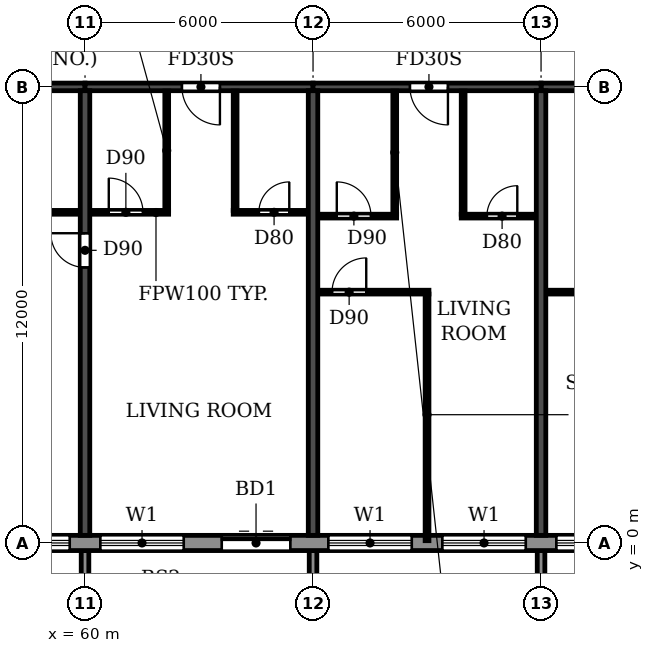
"""IFC4 building model, lengths in metres.
Left out: names, types, materials, properties, quantities, classifications, styles, units other than length and angle.
Written with IfcOpenShell. Run it as: python <this file> out.ifc"""

import sys

from ifc_helpers import new_model, si_unit, direction, frame, frame_2d, origin, place, context, subcontext, project, spatial, polyline, rectangle, outline, extrude, source, transform, mapped, element, fill, save


model = new_model("IFC4")
c1 = context("Model", 3, precision=1e-05, world=origin(), true_north=direction((0.0, 1.0)))
c2 = subcontext(c1, "Body", "Model", "MODEL_VIEW")
j1 = project(units=[si_unit("LENGTHUNIT", "METRE"), si_unit("PLANEANGLEUNIT", "RADIAN")], contexts=[c1])
p1 = place(None, origin())
s1 = spatial("IfcSite", under=j1, at=p1, CompositionType="ELEMENT")
p2 = place(p1, origin())
s2 = spatial("IfcBuilding", under=s1, at=p2, CompositionType="ELEMENT")
p3 = place(p2, frame((0.0, 0.0, 251.1)))
s3 = spatial("IfcBuildingStorey", under=s2, at=p3, CompositionType="ELEMENT", Elevation=251.1)
p4 = place(p3, frame((60.0, 0.2, 0.0), z_axis=(0.0, 0.0, 1.0), x_axis=(0.0, 1.0, 0.0)))
e1 = element("IfcWall", 1, at=p4, inside=s3, PredefinedType="SHEAR", context=c2, shape_type="SweptSolid", body=[
    extrude(rectangle(XDim=11.7, YDim=0.25, at=frame_2d((5.85, 0.0))), origin(), (0.0, 0.0, 1.0), 3.08),
])
p5 = place(p4, frame((7.05, 0.0, 0.0)))
e2 = element("IfcOpeningElement", 2, at=p5, cuts=e1, PredefinedType="OPENING", context=c2, shape_type="SweptSolid", body=[
    extrude(rectangle(XDim=0.9, YDim=2.1, at=frame_2d((0.45, 1.05))), frame((0.0, 0.135, 0.0), z_axis=(0.0, -1.0, 0.0), x_axis=(1.0, 0.0, 0.0)), (0.0, 0.0, 1.0), 0.27),
])
for number, where, z_axis, x_axis in (
    (3, (66.0, 0.2, 0.0), (0.0, 0.0, 1.0), (0.0, 1.0, 0.0)),
    (4, (72.0, 0.2, 0.0), (0.0, 0.0, 1.0), (0.0, 1.0, 0.0)),
):
    element("IfcWall", number, at=place(p3, frame(where, z_axis=z_axis, x_axis=x_axis)), inside=s3, PredefinedType="SHEAR", context=c2, shape_type="SweptSolid", body=[
        extrude(rectangle(XDim=11.7, YDim=0.25, at=frame_2d((5.85, 0.0))), origin(), (0.0, 0.0, 1.0), 3.08),
    ])
p6 = place(p3, frame((54.0, 12.0, 0.0), z_axis=(0.0, 0.0, 1.0), x_axis=(1.0, 0.0, 0.0)))
e5 = element("IfcWall", 5, at=p6, inside=s3, PredefinedType="SHEAR", context=c2, shape_type="SweptSolid", body=[
    extrude(rectangle(XDim=6.0, YDim=0.2, at=frame_2d((3.0, 0.0))), origin(), (0.0, 0.0, 1.0), 2.48),
])
p7 = place(p3, frame((60.0, 12.0, 0.0), z_axis=(0.0, 0.0, 1.0), x_axis=(1.0, 0.0, 0.0)))
e6 = element("IfcWall", 6, at=p7, inside=s3, PredefinedType="SHEAR", context=c2, shape_type="SweptSolid", body=[
    extrude(rectangle(XDim=6.0, YDim=0.2, at=frame_2d((3.0, 0.0))), origin(), (0.0, 0.0, 1.0), 2.48),
])
p8 = place(p7, frame((2.55, 0.0, 0.0)))
e7 = element("IfcOpeningElement", 7, at=p8, cuts=e6, PredefinedType="OPENING", context=c2, shape_type="SweptSolid", body=[
    extrude(rectangle(XDim=1.0, YDim=2.1, at=frame_2d((0.5, 1.05))), frame((0.0, 0.11, 0.0), z_axis=(0.0, -1.0, 0.0), x_axis=(1.0, 0.0, 0.0)), (0.0, 0.0, 1.0), 0.22),
])
p9 = place(p3, frame((66.0, 12.0, 0.0), z_axis=(0.0, 0.0, 1.0), x_axis=(1.0, 0.0, 0.0)))
e8 = element("IfcWall", 8, at=p9, inside=s3, PredefinedType="SHEAR", context=c2, shape_type="SweptSolid", body=[
    extrude(rectangle(XDim=6.0, YDim=0.2, at=frame_2d((3.0, 0.0))), origin(), (0.0, 0.0, 1.0), 2.48),
])
p10 = place(p9, frame((2.55, 0.0, 0.0)))
e9 = element("IfcOpeningElement", 9, at=p10, cuts=e8, PredefinedType="OPENING", context=c2, shape_type="SweptSolid", body=[
    extrude(rectangle(XDim=1.0, YDim=2.1, at=frame_2d((0.5, 1.05))), frame((0.0, 0.11, 0.0), z_axis=(0.0, -1.0, 0.0), x_axis=(1.0, 0.0, 0.0)), (0.0, 0.0, 1.0), 0.22),
])
p11 = place(p3, frame((72.0, 12.0, 0.0), z_axis=(0.0, 0.0, 1.0), x_axis=(1.0, 0.0, 0.0)))
e10 = element("IfcWall", 10, at=p11, inside=s3, PredefinedType="SHEAR", context=c2, shape_type="SweptSolid", body=[
    extrude(rectangle(XDim=6.0, YDim=0.2, at=frame_2d((3.0, 0.0))), origin(), (0.0, 0.0, 1.0), 2.48),
])
p12 = place(p11, frame((2.45, 0.0, 0.0)))
e11 = element("IfcOpeningElement", 11, at=p12, cuts=e10, PredefinedType="OPENING", context=c2, shape_type="SweptSolid", body=[
    extrude(rectangle(XDim=1.0, YDim=2.1, at=frame_2d((0.5, 1.05))), frame((0.0, 0.11, 0.0), z_axis=(0.0, -1.0, 0.0), x_axis=(1.0, 0.0, 0.0)), (0.0, 0.0, 1.0), 0.22),
])
p13 = place(p3, frame((22.683, 0.0, 0.0), z_axis=(0.0, 0.0, 1.0), x_axis=(1.0, 0.0, 0.0)))
e12 = element("IfcWall", 12, at=p13, inside=s3, PredefinedType="STANDARD", context=c2, shape_type="SweptSolid", body=[
    extrude(rectangle(XDim=56.634, YDim=0.4, at=frame_2d((28.317, 0.0))), origin(), (0.0, 0.0, 1.0), 3.08),
])
p14 = place(p13, frame((1.717, 0.0, 0.9)))
e13 = element("IfcOpeningElement", 13, at=p14, cuts=e12, PredefinedType="OPENING", context=c2, shape_type="SweptSolid", body=[
    extrude(rectangle(XDim=2.2, YDim=1.5, at=frame_2d((1.1, 0.75))), frame((0.0, 0.21, 0.0), z_axis=(0.0, -1.0, 0.0), x_axis=(1.0, 0.0, 0.0)), (0.0, 0.0, 1.0), 0.42),
])
p15 = place(p13, frame((4.917, 0.0, 0.0)))
e14 = element("IfcOpeningElement", 14, at=p15, cuts=e12, PredefinedType="OPENING", context=c2, shape_type="SweptSolid", body=[
    extrude(rectangle(XDim=1.8, YDim=2.4, at=frame_2d((0.9, 1.2))), frame((0.0, 0.21, 0.0), z_axis=(0.0, -1.0, 0.0), x_axis=(1.0, 0.0, 0.0)), (0.0, 0.0, 1.0), 0.42),
])
p16 = place(p13, frame((7.717, 0.0, 0.9)))
e15 = element("IfcOpeningElement", 15, at=p16, cuts=e12, PredefinedType="OPENING", context=c2, shape_type="SweptSolid", body=[
    extrude(rectangle(XDim=2.2, YDim=1.5, at=frame_2d((1.1, 0.75))), frame((0.0, 0.21, 0.0), z_axis=(0.0, -1.0, 0.0), x_axis=(1.0, 0.0, 0.0)), (0.0, 0.0, 1.0), 0.42),
])
p17 = place(p13, frame((10.717, 0.0, 0.9)))
e16 = element("IfcOpeningElement", 16, at=p17, cuts=e12, PredefinedType="OPENING", context=c2, shape_type="SweptSolid", body=[
    extrude(rectangle(XDim=2.2, YDim=1.5, at=frame_2d((1.1, 0.75))), frame((0.0, 0.21, 0.0), z_axis=(0.0, -1.0, 0.0), x_axis=(1.0, 0.0, 0.0)), (0.0, 0.0, 1.0), 0.42),
])
p18 = place(p13, frame((13.717, 0.0, 0.9)))
e17 = element("IfcOpeningElement", 17, at=p18, cuts=e12, PredefinedType="OPENING", context=c2, shape_type="SweptSolid", body=[
    extrude(rectangle(XDim=2.2, YDim=1.5, at=frame_2d((1.1, 0.75))), frame((0.0, 0.21, 0.0), z_axis=(0.0, -1.0, 0.0), x_axis=(1.0, 0.0, 0.0)), (0.0, 0.0, 1.0), 0.42),
])
p19 = place(p13, frame((16.917, 0.0, 0.0)))
e18 = element("IfcOpeningElement", 18, at=p19, cuts=e12, PredefinedType="OPENING", context=c2, shape_type="SweptSolid", body=[
    extrude(rectangle(XDim=1.8, YDim=2.4, at=frame_2d((0.9, 1.2))), frame((0.0, 0.21, 0.0), z_axis=(0.0, -1.0, 0.0), x_axis=(1.0, 0.0, 0.0)), (0.0, 0.0, 1.0), 0.42),
])
p20 = place(p13, frame((19.717, 0.0, 0.9)))
e19 = element("IfcOpeningElement", 19, at=p20, cuts=e12, PredefinedType="OPENING", context=c2, shape_type="SweptSolid", body=[
    extrude(rectangle(XDim=2.2, YDim=1.5, at=frame_2d((1.1, 0.75))), frame((0.0, 0.21, 0.0), z_axis=(0.0, -1.0, 0.0), x_axis=(1.0, 0.0, 0.0)), (0.0, 0.0, 1.0), 0.42),
])
p21 = place(p13, frame((22.717, 0.0, 0.9)))
e20 = element("IfcOpeningElement", 20, at=p21, cuts=e12, PredefinedType="OPENING", context=c2, shape_type="SweptSolid", body=[
    extrude(rectangle(XDim=2.2, YDim=1.5, at=frame_2d((1.1, 0.75))), frame((0.0, 0.21, 0.0), z_axis=(0.0, -1.0, 0.0), x_axis=(1.0, 0.0, 0.0)), (0.0, 0.0, 1.0), 0.42),
])
p22 = place(p13, frame((25.717, 0.0, 0.9)))
e21 = element("IfcOpeningElement", 21, at=p22, cuts=e12, PredefinedType="OPENING", context=c2, shape_type="SweptSolid", body=[
    extrude(rectangle(XDim=2.2, YDim=1.5, at=frame_2d((1.1, 0.75))), frame((0.0, 0.21, 0.0), z_axis=(0.0, -1.0, 0.0), x_axis=(1.0, 0.0, 0.0)), (0.0, 0.0, 1.0), 0.42),
])
p23 = place(p13, frame((28.917, 0.0, 0.0)))
e22 = element("IfcOpeningElement", 22, at=p23, cuts=e12, PredefinedType="OPENING", context=c2, shape_type="SweptSolid", body=[
    extrude(rectangle(XDim=1.8, YDim=2.4, at=frame_2d((0.9, 1.2))), frame((0.0, 0.21, 0.0), z_axis=(0.0, -1.0, 0.0), x_axis=(1.0, 0.0, 0.0)), (0.0, 0.0, 1.0), 0.42),
])
p24 = place(p13, frame((31.717, 0.0, 0.9)))
e23 = element("IfcOpeningElement", 23, at=p24, cuts=e12, PredefinedType="OPENING", context=c2, shape_type="SweptSolid", body=[
    extrude(rectangle(XDim=2.2, YDim=1.5, at=frame_2d((1.1, 0.75))), frame((0.0, 0.21, 0.0), z_axis=(0.0, -1.0, 0.0), x_axis=(1.0, 0.0, 0.0)), (0.0, 0.0, 1.0), 0.42),
])
p25 = place(p13, frame((34.717, 0.0, 0.9)))
e24 = element("IfcOpeningElement", 24, at=p25, cuts=e12, PredefinedType="OPENING", context=c2, shape_type="SweptSolid", body=[
    extrude(rectangle(XDim=2.2, YDim=1.5, at=frame_2d((1.1, 0.75))), frame((0.0, 0.21, 0.0), z_axis=(0.0, -1.0, 0.0), x_axis=(1.0, 0.0, 0.0)), (0.0, 0.0, 1.0), 0.42),
])
p26 = place(p13, frame((37.717, 0.0, 0.9)))
e25 = element("IfcOpeningElement", 25, at=p26, cuts=e12, PredefinedType="OPENING", context=c2, shape_type="SweptSolid", body=[
    extrude(rectangle(XDim=2.2, YDim=1.5, at=frame_2d((1.1, 0.75))), frame((0.0, 0.21, 0.0), z_axis=(0.0, -1.0, 0.0), x_axis=(1.0, 0.0, 0.0)), (0.0, 0.0, 1.0), 0.42),
])
p27 = place(p13, frame((40.917, 0.0, 0.0)))
e26 = element("IfcOpeningElement", 26, at=p27, cuts=e12, PredefinedType="OPENING", context=c2, shape_type="SweptSolid", body=[
    extrude(rectangle(XDim=1.8, YDim=2.4, at=frame_2d((0.9, 1.2))), frame((0.0, 0.21, 0.0), z_axis=(0.0, -1.0, 0.0), x_axis=(1.0, 0.0, 0.0)), (0.0, 0.0, 1.0), 0.42),
])
p28 = place(p13, frame((43.717, 0.0, 0.9)))
e27 = element("IfcOpeningElement", 27, at=p28, cuts=e12, PredefinedType="OPENING", context=c2, shape_type="SweptSolid", body=[
    extrude(rectangle(XDim=2.2, YDim=1.5, at=frame_2d((1.1, 0.75))), frame((0.0, 0.21, 0.0), z_axis=(0.0, -1.0, 0.0), x_axis=(1.0, 0.0, 0.0)), (0.0, 0.0, 1.0), 0.42),
])
p29 = place(p13, frame((46.717, 0.0, 0.9)))
e28 = element("IfcOpeningElement", 28, at=p29, cuts=e12, PredefinedType="OPENING", context=c2, shape_type="SweptSolid", body=[
    extrude(rectangle(XDim=2.2, YDim=1.5, at=frame_2d((1.1, 0.75))), frame((0.0, 0.21, 0.0), z_axis=(0.0, -1.0, 0.0), x_axis=(1.0, 0.0, 0.0)), (0.0, 0.0, 1.0), 0.42),
])
p30 = place(p13, frame((49.717, 0.0, 0.9)))
e29 = element("IfcOpeningElement", 29, at=p30, cuts=e12, PredefinedType="OPENING", context=c2, shape_type="SweptSolid", body=[
    extrude(rectangle(XDim=2.2, YDim=1.5, at=frame_2d((1.1, 0.75))), frame((0.0, 0.21, 0.0), z_axis=(0.0, -1.0, 0.0), x_axis=(1.0, 0.0, 0.0)), (0.0, 0.0, 1.0), 0.42),
])
p31 = place(p13, frame((52.917, 0.0, 0.0)))
e30 = element("IfcOpeningElement", 30, at=p31, cuts=e12, PredefinedType="OPENING", context=c2, shape_type="SweptSolid", body=[
    extrude(rectangle(XDim=1.8, YDim=2.4, at=frame_2d((0.9, 1.2))), frame((0.0, 0.21, 0.0), z_axis=(0.0, -1.0, 0.0), x_axis=(1.0, 0.0, 0.0)), (0.0, 0.0, 1.0), 0.42),
])
m1 = source(origin(), c2, "Body", "SweptSolid", [
    extrude(outline(polyline([(0.0, 0.0), (0.2, 0.0), (0.2, 1.65), (0.0, 1.65), (0.0, 0.0)])), origin(), (0.0, 0.0, 1.0), 3.1),
])
for number, where in (
    (31, (59.9, -1.85, 0.0)),
    (32, (65.9, -1.85, 0.0)),
    (33, (71.9, -1.85, 0.0)),
):
    element("IfcWall", number, at=place(p3, frame(where)), inside=s3, PredefinedType="STANDARD", context=c2, shape_type="MappedRepresentation", body=[
        mapped(m1, transform((0.0, 0.0, 0.0))),
    ])
p32 = place(p3, frame((66.135, 6.6, 0.0), z_axis=(0.0, 0.0, 1.0), x_axis=(1.0, 0.0, 0.0)))
e34 = element("IfcWall", 34, at=p32, inside=s3, PredefinedType="PARTITIONING", context=c2, shape_type="SweptSolid", body=[
    extrude(rectangle(XDim=2.915, YDim=0.1, at=frame_2d((1.458, 0.0))), origin(), (0.0, 0.0, 1.0), 3.08),
])
p33 = place(p32, frame((0.365, 0.0, 0.0)))
e35 = element("IfcOpeningElement", 35, at=p33, cuts=e34, PredefinedType="OPENING", context=c2, shape_type="SweptSolid", body=[
    extrude(rectangle(XDim=0.9, YDim=2.1, at=frame_2d((0.45, 1.05))), frame((0.0, 0.06, 0.0), z_axis=(0.0, -1.0, 0.0), x_axis=(1.0, 0.0, 0.0)), (0.0, 0.0, 1.0), 0.12),
])
p34 = place(p3, frame((72.135, 6.6, 0.0), z_axis=(0.0, 0.0, 1.0), x_axis=(1.0, 0.0, 0.0)))
e36 = element("IfcWall", 36, at=p34, inside=s3, PredefinedType="PARTITIONING", context=c2, shape_type="SweptSolid", body=[
    extrude(rectangle(XDim=1.965, YDim=0.1, at=frame_2d((0.982, 0.0))), origin(), (0.0, 0.0, 1.0), 3.08),
])
p35 = place(p3, frame((66.135, 8.6, 0.0), z_axis=(0.0, 0.0, 1.0), x_axis=(1.0, 0.0, 0.0)))
e37 = element("IfcWall", 37, at=p35, inside=s3, PredefinedType="PARTITIONING", context=c2, shape_type="SweptSolid", body=[
    extrude(rectangle(XDim=2.065, YDim=0.1, at=frame_2d((1.032, 0.0))), origin(), (0.0, 0.0, 1.0), 3.08),
])
p36 = place(p35, frame((0.49, 0.0, 0.0)))
e38 = element("IfcOpeningElement", 38, at=p36, cuts=e37, PredefinedType="OPENING", context=c2, shape_type="SweptSolid", body=[
    extrude(rectangle(XDim=0.9, YDim=2.1, at=frame_2d((0.45, 1.05))), frame((0.0, 0.06, 0.0), z_axis=(0.0, -1.0, 0.0), x_axis=(1.0, 0.0, 0.0)), (0.0, 0.0, 1.0), 0.12),
])
p37 = place(p3, frame((69.9, 8.6, 0.0), z_axis=(0.0, 0.0, 1.0), x_axis=(1.0, 0.0, 0.0)))
e39 = element("IfcWall", 39, at=p37, inside=s3, PredefinedType="PARTITIONING", context=c2, shape_type="SweptSolid", body=[
    extrude(rectangle(XDim=1.965, YDim=0.1, at=frame_2d((0.982, 0.0))), origin(), (0.0, 0.0, 1.0), 3.08),
])
p38 = place(p37, frame((0.675, 0.0, 0.0)))
e40 = element("IfcOpeningElement", 40, at=p38, cuts=e39, PredefinedType="OPENING", context=c2, shape_type="SweptSolid", body=[
    extrude(rectangle(XDim=0.8, YDim=2.1, at=frame_2d((0.4, 1.05))), frame((0.0, 0.06, 0.0), z_axis=(0.0, -1.0, 0.0), x_axis=(1.0, 0.0, 0.0)), (0.0, 0.0, 1.0), 0.12),
])
p39 = place(p3, frame((57.1, 8.7, 0.0), z_axis=(0.0, 0.0, 1.0), x_axis=(1.0, 0.0, 0.0)))
e41 = element("IfcWall", 41, at=p39, inside=s3, PredefinedType="PARTITIONING", context=c2, shape_type="SweptSolid", body=[
    extrude(rectangle(XDim=2.765, YDim=0.1, at=frame_2d((1.382, 0.0))), origin(), (0.0, 0.0, 1.0), 3.08),
])
p40 = place(p39, frame((1.0, 0.0, 0.0)))
e42 = element("IfcOpeningElement", 42, at=p40, cuts=e41, PredefinedType="OPENING", context=c2, shape_type="SweptSolid", body=[
    extrude(rectangle(XDim=0.8, YDim=2.1, at=frame_2d((0.4, 1.05))), frame((0.0, 0.06, 0.0), z_axis=(0.0, -1.0, 0.0), x_axis=(1.0, 0.0, 0.0)), (0.0, 0.0, 1.0), 0.12),
])
p41 = place(p3, frame((60.135, 8.7, 0.0), z_axis=(0.0, 0.0, 1.0), x_axis=(1.0, 0.0, 0.0)))
e43 = element("IfcWall", 43, at=p41, inside=s3, PredefinedType="PARTITIONING", context=c2, shape_type="SweptSolid", body=[
    extrude(rectangle(XDim=2.065, YDim=0.1, at=frame_2d((1.032, 0.0))), origin(), (0.0, 0.0, 1.0), 3.08),
])
p42 = place(p41, frame((0.49, 0.0, 0.0)))
e44 = element("IfcOpeningElement", 44, at=p42, cuts=e43, PredefinedType="OPENING", context=c2, shape_type="SweptSolid", body=[
    extrude(rectangle(XDim=0.9, YDim=2.1, at=frame_2d((0.45, 1.05))), frame((0.0, 0.06, 0.0), z_axis=(0.0, -1.0, 0.0), x_axis=(1.0, 0.0, 0.0)), (0.0, 0.0, 1.0), 0.12),
])
p43 = place(p3, frame((63.9, 8.7, 0.0), z_axis=(0.0, 0.0, 1.0), x_axis=(1.0, 0.0, 0.0)))
e45 = element("IfcWall", 45, at=p43, inside=s3, PredefinedType="PARTITIONING", context=c2, shape_type="SweptSolid", body=[
    extrude(rectangle(XDim=1.965, YDim=0.1, at=frame_2d((0.982, 0.0))), origin(), (0.0, 0.0, 1.0), 3.08),
])
p44 = place(p43, frame((0.675, 0.0, 0.0)))
e46 = element("IfcOpeningElement", 46, at=p44, cuts=e45, PredefinedType="OPENING", context=c2, shape_type="SweptSolid", body=[
    extrude(rectangle(XDim=0.8, YDim=2.1, at=frame_2d((0.4, 1.05))), frame((0.0, 0.06, 0.0), z_axis=(0.0, -1.0, 0.0), x_axis=(1.0, 0.0, 0.0)), (0.0, 0.0, 1.0), 0.12),
])
for number, where, z_axis, x_axis in (
    (47, (62.15, 8.75, 0.0), (0.0, 0.0, 1.0), (0.0, 1.0, 0.0)),
    (48, (63.95, 8.75, 0.0), (0.0, 0.0, 1.0), (0.0, 1.0, 0.0)),
):
    element("IfcWall", number, at=place(p3, frame(where, z_axis=z_axis, x_axis=x_axis)), inside=s3, PredefinedType="PARTITIONING", context=c2, shape_type="SweptSolid", body=[
        extrude(rectangle(XDim=3.14, YDim=0.1, at=frame_2d((1.57, 0.0))), origin(), (0.0, 0.0, 1.0), 3.08),
    ])
p45 = place(p3, frame((68.15, 8.65, 0.0), z_axis=(0.0, 0.0, 1.0), x_axis=(0.0, 1.0, 0.0)))
e49 = element("IfcWall", 49, at=p45, inside=s3, PredefinedType="PARTITIONING", context=c2, shape_type="SweptSolid", body=[
    extrude(rectangle(XDim=3.24, YDim=0.1, at=frame_2d((1.62, 0.0))), origin(), (0.0, 0.0, 1.0), 3.08),
])
p46 = place(p3, frame((69.0, 0.06, 0.0), z_axis=(0.0, 0.0, 1.0), x_axis=(0.0, 1.0, 0.0)))
e50 = element("IfcWall", 50, at=p46, inside=s3, PredefinedType="PARTITIONING", context=c2, shape_type="SweptSolid", body=[
    extrude(rectangle(XDim=6.49, YDim=0.1, at=frame_2d((3.245, 0.0))), origin(), (0.0, 0.0, 1.0), 3.08),
])
p47 = place(p3, frame((69.95, 8.65, 0.0), z_axis=(0.0, 0.0, 1.0), x_axis=(0.0, 1.0, 0.0)))
e51 = element("IfcWall", 51, at=p47, inside=s3, PredefinedType="PARTITIONING", context=c2, shape_type="SweptSolid", body=[
    extrude(rectangle(XDim=3.24, YDim=0.1, at=frame_2d((1.62, 0.0))), origin(), (0.0, 0.0, 1.0), 3.08),
])
p48 = place(p25, origin())
e52 = element("IfcWindow", 52, at=p48, inside=s3, PartitioningType="DOUBLE_PANEL_HORIZONTAL", PredefinedType="WINDOW", context=c2, shape_type="SweptSolid", body=[
    extrude(rectangle(XDim=2.2, YDim=1.5, at=frame_2d((1.1, 0.75))), frame((0.0, 0.03, 0.0), z_axis=(0.0, -1.0, 0.0), x_axis=(1.0, 0.0, 0.0)), (0.0, 0.0, 1.0), 0.06),
])
fill(e24, e52)
p49 = place(p26, origin())
e53 = element("IfcWindow", 53, at=p49, inside=s3, PartitioningType="DOUBLE_PANEL_HORIZONTAL", PredefinedType="WINDOW", context=c2, shape_type="SweptSolid", body=[
    extrude(rectangle(XDim=2.2, YDim=1.5, at=frame_2d((1.1, 0.75))), frame((0.0, 0.03, 0.0), z_axis=(0.0, -1.0, 0.0), x_axis=(1.0, 0.0, 0.0)), (0.0, 0.0, 1.0), 0.06),
])
fill(e25, e53)
p50 = place(p27, origin())
e54 = element("IfcDoor", 54, at=p50, inside=s3, OperationType="DOUBLE_DOOR_SLIDING", PredefinedType="DOOR", context=c2, shape_type="SweptSolid", body=[
    extrude(rectangle(XDim=1.8, YDim=2.4, at=frame_2d((0.9, 1.2))), frame((0.0, 0.025, 0.0), z_axis=(0.0, -1.0, 0.0), x_axis=(1.0, 0.0, 0.0)), (0.0, 0.0, 1.0), 0.05),
])
fill(e26, e54)
p51 = place(p28, origin())
e55 = element("IfcWindow", 55, at=p51, inside=s3, PartitioningType="DOUBLE_PANEL_HORIZONTAL", PredefinedType="WINDOW", context=c2, shape_type="SweptSolid", body=[
    extrude(rectangle(XDim=2.2, YDim=1.5, at=frame_2d((1.1, 0.75))), frame((0.0, 0.03, 0.0), z_axis=(0.0, -1.0, 0.0), x_axis=(1.0, 0.0, 0.0)), (0.0, 0.0, 1.0), 0.06),
])
fill(e27, e55)
p52 = place(p29, origin())
e56 = element("IfcWindow", 56, at=p52, inside=s3, PartitioningType="DOUBLE_PANEL_HORIZONTAL", PredefinedType="WINDOW", context=c2, shape_type="SweptSolid", body=[
    extrude(rectangle(XDim=2.2, YDim=1.5, at=frame_2d((1.1, 0.75))), frame((0.0, 0.03, 0.0), z_axis=(0.0, -1.0, 0.0), x_axis=(1.0, 0.0, 0.0)), (0.0, 0.0, 1.0), 0.06),
])
fill(e28, e56)
p53 = place(p30, origin())
e57 = element("IfcWindow", 57, at=p53, inside=s3, PartitioningType="DOUBLE_PANEL_HORIZONTAL", PredefinedType="WINDOW", context=c2, shape_type="SweptSolid", body=[
    extrude(rectangle(XDim=2.2, YDim=1.5, at=frame_2d((1.1, 0.75))), frame((0.0, 0.03, 0.0), z_axis=(0.0, -1.0, 0.0), x_axis=(1.0, 0.0, 0.0)), (0.0, 0.0, 1.0), 0.06),
])
fill(e29, e57)
p54 = place(p5, origin())
e58 = element("IfcDoor", 58, at=p54, inside=s3, OperationType="SINGLE_SWING_RIGHT", PredefinedType="DOOR", context=c2, shape_type="SweptSolid", body=[
    extrude(rectangle(XDim=0.9, YDim=2.1, at=frame_2d((0.45, 1.05))), frame((0.0, 0.025, 0.0), z_axis=(0.0, -1.0, 0.0), x_axis=(1.0, 0.0, 0.0)), (0.0, 0.0, 1.0), 0.05),
])
fill(e2, e58)
p55 = place(p42, origin())
e59 = element("IfcDoor", 59, at=p55, inside=s3, OperationType="SINGLE_SWING_LEFT", PredefinedType="DOOR", context=c2, shape_type="SweptSolid", body=[
    extrude(rectangle(XDim=0.9, YDim=2.1, at=frame_2d((0.45, 1.05))), frame((0.0, 0.025, 0.0), z_axis=(0.0, -1.0, 0.0), x_axis=(1.0, 0.0, 0.0)), (0.0, 0.0, 1.0), 0.05),
])
fill(e44, e59)
p56 = place(p8, frame((1.0, 0.0, 0.0), z_axis=(0.0, 0.0, 1.0), x_axis=(-1.0, 0.0, 0.0)))
e60 = element("IfcDoor", 60, at=p56, inside=s3, OperationType="SINGLE_SWING_LEFT", PredefinedType="DOOR", context=c2, shape_type="SweptSolid", body=[
    extrude(rectangle(XDim=1.0, YDim=2.1, at=frame_2d((0.5, 1.05))), frame((0.0, 0.025, 0.0), z_axis=(0.0, -1.0, 0.0), x_axis=(1.0, 0.0, 0.0)), (0.0, 0.0, 1.0), 0.05),
])
fill(e7, e60)
p57 = place(p44, origin())
e61 = element("IfcDoor", 61, at=p57, inside=s3, OperationType="SINGLE_SWING_RIGHT", PredefinedType="DOOR", context=c2, shape_type="SweptSolid", body=[
    extrude(rectangle(XDim=0.8, YDim=2.1, at=frame_2d((0.4, 1.05))), frame((0.0, 0.025, 0.0), z_axis=(0.0, -1.0, 0.0), x_axis=(1.0, 0.0, 0.0)), (0.0, 0.0, 1.0), 0.05),
])
fill(e46, e61)
p58 = place(p33, origin())
e62 = element("IfcDoor", 62, at=p58, inside=s3, OperationType="SINGLE_SWING_RIGHT", PredefinedType="DOOR", context=c2, shape_type="SweptSolid", body=[
    extrude(rectangle(XDim=0.9, YDim=2.1, at=frame_2d((0.45, 1.05))), frame((0.0, 0.025, 0.0), z_axis=(0.0, -1.0, 0.0), x_axis=(1.0, 0.0, 0.0)), (0.0, 0.0, 1.0), 0.05),
])
fill(e35, e62)
p59 = place(p36, origin())
e63 = element("IfcDoor", 63, at=p59, inside=s3, OperationType="SINGLE_SWING_LEFT", PredefinedType="DOOR", context=c2, shape_type="SweptSolid", body=[
    extrude(rectangle(XDim=0.9, YDim=2.1, at=frame_2d((0.45, 1.05))), frame((0.0, 0.025, 0.0), z_axis=(0.0, -1.0, 0.0), x_axis=(1.0, 0.0, 0.0)), (0.0, 0.0, 1.0), 0.05),
])
fill(e38, e63)
p60 = place(p10, frame((1.0, 0.0, 0.0), z_axis=(0.0, 0.0, 1.0), x_axis=(-1.0, 0.0, 0.0)))
e64 = element("IfcDoor", 64, at=p60, inside=s3, OperationType="SINGLE_SWING_LEFT", PredefinedType="DOOR", context=c2, shape_type="SweptSolid", body=[
    extrude(rectangle(XDim=1.0, YDim=2.1, at=frame_2d((0.5, 1.05))), frame((0.0, 0.025, 0.0), z_axis=(0.0, -1.0, 0.0), x_axis=(1.0, 0.0, 0.0)), (0.0, 0.0, 1.0), 0.05),
])
fill(e9, e64)
p61 = place(p38, origin())
e65 = element("IfcDoor", 65, at=p61, inside=s3, OperationType="SINGLE_SWING_RIGHT", PredefinedType="DOOR", context=c2, shape_type="SweptSolid", body=[
    extrude(rectangle(XDim=0.8, YDim=2.1, at=frame_2d((0.4, 1.05))), frame((0.0, 0.025, 0.0), z_axis=(0.0, -1.0, 0.0), x_axis=(1.0, 0.0, 0.0)), (0.0, 0.0, 1.0), 0.05),
])
fill(e40, e65)
save(model, sys.argv[1])
